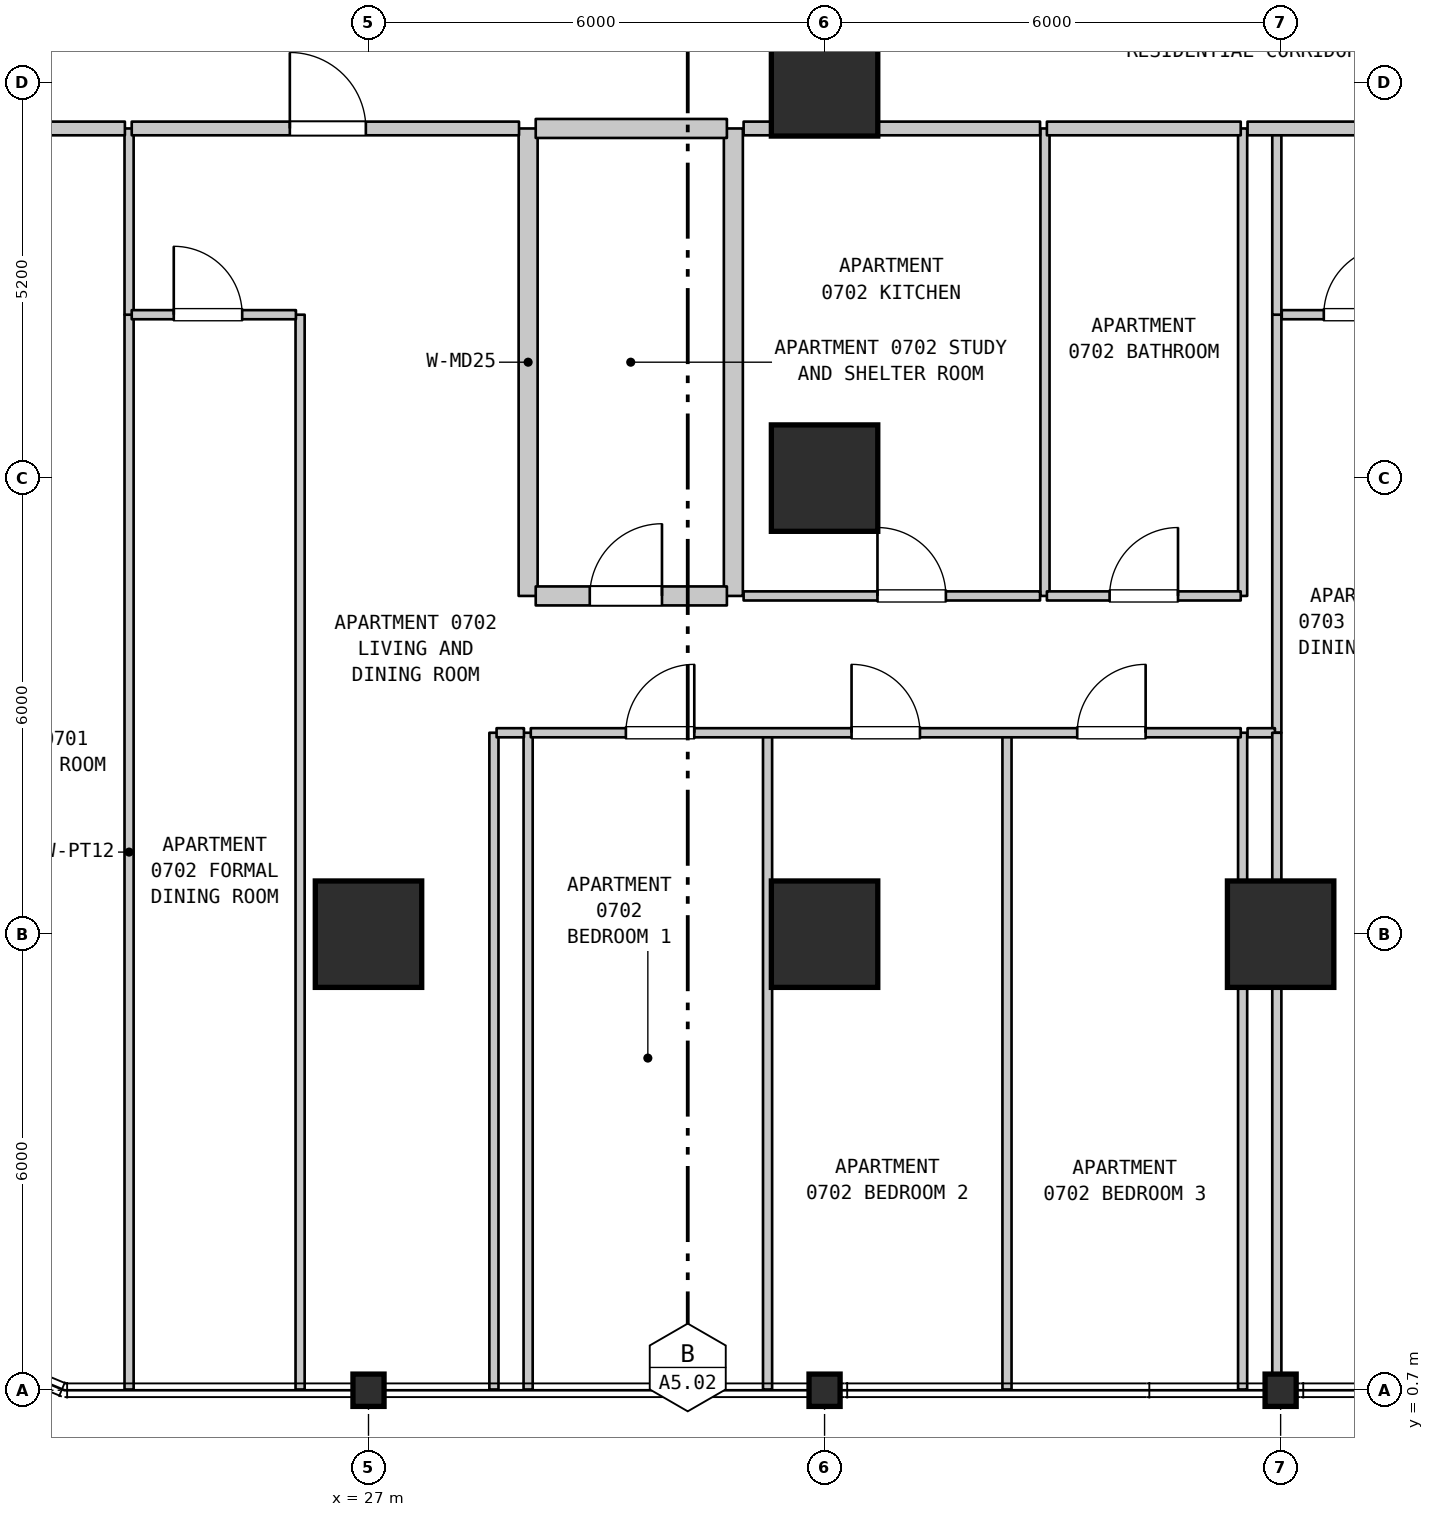
"""IFC4 building model, lengths in metres.
Left out: names, types, materials, properties, quantities, classifications, styles, units other than length and angle.
Written with IfcOpenShell. Run it as: python <this file> out.ifc"""

import sys

from ifc_helpers import new_model, si_unit, direction, frame, frame_2d, origin, origin_2d, place, context, subcontext, project, spatial, rectangle, i_section, extrude, element, fill, save


model = new_model("IFC4")
c1 = context("Model", 3, precision=1e-05, world=origin(), true_north=direction((0.0, 1.0)))
c2 = subcontext(c1, "Body", "Model", "MODEL_VIEW")
j1 = project(units=[si_unit("LENGTHUNIT", "METRE"), si_unit("PLANEANGLEUNIT", "RADIAN")], contexts=[c1])
p1 = place(None, origin())
s1 = spatial("IfcSite", under=j1, at=p1, CompositionType="ELEMENT")
p2 = place(p1, origin())
s2 = spatial("IfcBuilding", under=s1, at=p2, CompositionType="ELEMENT")
p3 = place(p2, frame((0.0, 0.0, 35.1)))
s3 = spatial("IfcBuildingStorey", under=s2, at=p3, CompositionType="ELEMENT", Elevation=35.1)
p4 = place(p3, frame((27.0, 0.7, 0.0), z_axis=(0.0, 0.0, 1.0), x_axis=(1.0, 0.0, 0.0)))
e1 = element("IfcColumn", 1, at=p4, inside=s3, PredefinedType="COLUMN", context=c2, shape_type="SweptSolid", body=[
    extrude(i_section(OverallWidth=0.409, OverallDepth=0.425, WebThickness=0.032, FlangeThickness=0.052, FilletRadius=0.015, at=origin_2d()), origin(), (0.0, 0.0, 1.0), 3.7),
])
p5 = place(p3, frame((27.0, 6.7, 0.0), z_axis=(0.0, 0.0, 1.0), x_axis=(1.0, 0.0, 0.0)))
e2 = element("IfcColumn", 2, at=p5, inside=s3, PredefinedType="COLUMN", context=c2, shape_type="SweptSolid", body=[
    extrude(rectangle(XDim=1.4, YDim=1.4, at=origin_2d()), origin(), (0.0, 0.0, 1.0), 3.7),
])
p6 = place(p3, frame((33.0, 0.7, 0.0), z_axis=(0.0, 0.0, 1.0), x_axis=(1.0, 0.0, 0.0)))
e3 = element("IfcColumn", 3, at=p6, inside=s3, PredefinedType="COLUMN", context=c2, shape_type="SweptSolid", body=[
    extrude(i_section(OverallWidth=0.409, OverallDepth=0.425, WebThickness=0.032, FlangeThickness=0.052, FilletRadius=0.015, at=origin_2d()), origin(), (0.0, 0.0, 1.0), 3.7),
])
for number, where, z_axis, x_axis in (
    (4, (33.0, 6.7, 0.0), (0.0, 0.0, 1.0), (1.0, 0.0, 0.0)),
    (5, (33.0, 12.7, 0.0), (0.0, 0.0, 1.0), (1.0, 0.0, 0.0)),
    (6, (33.0, 17.9, 0.0), (0.0, 0.0, 1.0), (1.0, 0.0, 0.0)),
):
    element("IfcColumn", number, at=place(p3, frame(where, z_axis=z_axis, x_axis=x_axis)), inside=s3, PredefinedType="COLUMN", context=c2, shape_type="SweptSolid", body=[
        extrude(rectangle(XDim=1.4, YDim=1.4, at=origin_2d()), origin(), (0.0, 0.0, 1.0), 3.7),
    ])
p7 = place(p3, frame((39.0, 0.7, 0.0), z_axis=(0.0, 0.0, 1.0), x_axis=(1.0, 0.0, 0.0)))
e7 = element("IfcColumn", 7, at=p7, inside=s3, PredefinedType="COLUMN", context=c2, shape_type="SweptSolid", body=[
    extrude(i_section(OverallWidth=0.409, OverallDepth=0.425, WebThickness=0.032, FlangeThickness=0.052, FilletRadius=0.015, at=origin_2d()), origin(), (0.0, 0.0, 1.0), 3.7),
])
p8 = place(p3, frame((39.0, 6.7, 0.0), z_axis=(0.0, 0.0, 1.0), x_axis=(1.0, 0.0, 0.0)))
e8 = element("IfcColumn", 8, at=p8, inside=s3, PredefinedType="COLUMN", context=c2, shape_type="SweptSolid", body=[
    extrude(rectangle(XDim=1.4, YDim=1.4, at=origin_2d()), origin(), (0.0, 0.0, 1.0), 3.7),
])
p9 = place(p3, frame((23.85, 0.71, 0.0), z_axis=(0.0, 0.0, 1.0), x_axis=(0.0, 1.0, 0.0)))
e9 = element("IfcWall", 9, at=p9, inside=s3, PredefinedType="PARTITIONING", context=c2, shape_type="SweptSolid", body=[
    extrude(rectangle(XDim=14.14, YDim=0.12, at=frame_2d((7.07, 0.0))), origin(), (0.0, 0.0, 1.0), 3.385),
])
p10 = place(p3, frame((23.85, 14.85, 0.0), z_axis=(0.0, 0.0, 1.0), x_axis=(0.0, 1.0, 0.0)))
e10 = element("IfcWall", 10, at=p10, inside=s3, PredefinedType="PARTITIONING", context=c2, shape_type="SweptSolid", body=[
    extrude(rectangle(XDim=2.45, YDim=0.12, at=frame_2d((1.225, 0.0))), origin(), (0.0, 0.0, 1.0), 3.385),
])
p11 = place(p3, frame((26.1, 0.71, 0.0), z_axis=(0.0, 0.0, 1.0), x_axis=(0.0, 1.0, 0.0)))
e11 = element("IfcWall", 11, at=p11, inside=s3, PredefinedType="PARTITIONING", context=c2, shape_type="SweptSolid", body=[
    extrude(rectangle(XDim=14.14, YDim=0.12, at=frame_2d((7.07, 0.0))), origin(), (0.0, 0.0, 1.0), 3.385),
])
for number, where, z_axis, x_axis in (
    (12, (28.65, 0.71, 0.0), (0.0, 0.0, 1.0), (0.0, 1.0, 0.0)),
    (13, (29.1, 0.71, 0.0), (0.0, 0.0, 1.0), (0.0, 1.0, 0.0)),
):
    element("IfcWall", number, at=place(p3, frame(where, z_axis=z_axis, x_axis=x_axis)), inside=s3, PredefinedType="PARTITIONING", context=c2, shape_type="SweptSolid", body=[
        extrude(rectangle(XDim=8.64, YDim=0.12, at=frame_2d((4.32, 0.0))), origin(), (0.0, 0.0, 1.0), 3.385),
    ])
for number, where, z_axis, x_axis in (
    (14, (29.1, 11.15, 0.0), (0.0, 0.0, 1.0), (0.0, 1.0, 0.0)),
    (15, (31.8, 11.15, 0.0), (0.0, 0.0, 1.0), (0.0, 1.0, 0.0)),
):
    element("IfcWall", number, at=place(p3, frame(where, z_axis=z_axis, x_axis=x_axis)), inside=s3, PredefinedType="STANDARD", context=c2, shape_type="SweptSolid", body=[
        extrude(rectangle(XDim=6.15, YDim=0.25, at=frame_2d((3.075, 0.0))), origin(), (0.0, 0.0, 1.0), 3.385),
    ])
for number, where, z_axis, x_axis in (
    (16, (32.25, 0.71, 0.0), (0.0, 0.0, 1.0), (0.0, 1.0, 0.0)),
    (17, (35.4, 0.71, 0.0), (0.0, 0.0, 1.0), (0.0, 1.0, 0.0)),
):
    element("IfcWall", number, at=place(p3, frame(where, z_axis=z_axis, x_axis=x_axis)), inside=s3, PredefinedType="PARTITIONING", context=c2, shape_type="SweptSolid", body=[
        extrude(rectangle(XDim=8.64, YDim=0.12, at=frame_2d((4.32, 0.0))), origin(), (0.0, 0.0, 1.0), 3.385),
    ])
p12 = place(p3, frame((35.9, 11.15, 0.0), z_axis=(0.0, 0.0, 1.0), x_axis=(0.0, 1.0, 0.0)))
e18 = element("IfcWall", 18, at=p12, inside=s3, PredefinedType="PARTITIONING", context=c2, shape_type="SweptSolid", body=[
    extrude(rectangle(XDim=6.15, YDim=0.12, at=frame_2d((3.075, 0.0))), origin(), (0.0, 0.0, 1.0), 3.385),
])
p13 = place(p3, frame((38.5, 0.71, 0.0), z_axis=(0.0, 0.0, 1.0), x_axis=(0.0, 1.0, 0.0)))
e19 = element("IfcWall", 19, at=p13, inside=s3, PredefinedType="PARTITIONING", context=c2, shape_type="SweptSolid", body=[
    extrude(rectangle(XDim=8.64, YDim=0.12, at=frame_2d((4.32, 0.0))), origin(), (0.0, 0.0, 1.0), 3.385),
])
p14 = place(p3, frame((38.5, 11.15, 0.0), z_axis=(0.0, 0.0, 1.0), x_axis=(0.0, 1.0, 0.0)))
e20 = element("IfcWall", 20, at=p14, inside=s3, PredefinedType="PARTITIONING", context=c2, shape_type="SweptSolid", body=[
    extrude(rectangle(XDim=6.15, YDim=0.12, at=frame_2d((3.075, 0.0))), origin(), (0.0, 0.0, 1.0), 3.385),
])
p15 = place(p3, frame((38.95, 0.71, 0.0), z_axis=(0.0, 0.0, 1.0), x_axis=(0.0, 1.0, 0.0)))
e21 = element("IfcWall", 21, at=p15, inside=s3, PredefinedType="PARTITIONING", context=c2, shape_type="SweptSolid", body=[
    extrude(rectangle(XDim=5.99, YDim=0.12, at=frame_2d((2.995, 0.0))), origin(), (0.0, 0.0, 1.0), 2.885),
])
p16 = place(p3, frame((38.95, 9.35, 0.0), z_axis=(0.0, 0.0, 1.0), x_axis=(0.0, 1.0, 0.0)))
e22 = element("IfcWall", 22, at=p16, inside=s3, PredefinedType="PARTITIONING", context=c2, shape_type="SweptSolid", body=[
    extrude(rectangle(XDim=5.5, YDim=0.12, at=frame_2d((2.75, 0.0))), origin(), (0.0, 0.0, 1.0), 3.385),
])
p17 = place(p3, frame((38.95, 14.85, 0.0), z_axis=(0.0, 0.0, 1.0), x_axis=(0.0, 1.0, 0.0)))
e23 = element("IfcWall", 23, at=p17, inside=s3, PredefinedType="PARTITIONING", context=c2, shape_type="SweptSolid", body=[
    extrude(rectangle(XDim=2.45, YDim=0.12, at=frame_2d((1.225, 0.0))), origin(), (0.0, 0.0, 1.0), 3.385),
])
p18 = place(p3, frame((28.685, 9.35, 0.0), z_axis=(0.0, 0.0, 1.0), x_axis=(1.0, 0.0, 0.0)))
e24 = element("IfcWall", 24, at=p18, inside=s3, PredefinedType="PARTITIONING", context=c2, shape_type="SweptSolid", body=[
    extrude(rectangle(XDim=0.36, YDim=0.12, at=frame_2d((0.18, 0.0))), origin(), (0.0, 0.0, 1.0), 3.385),
])
p19 = place(p3, frame((29.135, 9.35, 0.0), z_axis=(0.0, 0.0, 1.0), x_axis=(1.0, 0.0, 0.0)))
e25 = element("IfcWall", 25, at=p19, inside=s3, PredefinedType="PARTITIONING", context=c2, shape_type="SweptSolid", body=[
    extrude(rectangle(XDim=9.34, YDim=0.12, at=frame_2d((4.67, 0.0))), origin(), (0.0, 0.0, 1.0), 3.385),
])
p20 = place(p19, frame((1.251, 0.0, 0.0)))
e26 = element("IfcOpeningElement", 26, at=p20, cuts=e25, PredefinedType="OPENING", context=c2, shape_type="SweptSolid", body=[
    extrude(rectangle(XDim=0.9, YDim=2.15, at=frame_2d((0.45, 1.075))), frame((0.0, 0.07, 0.0), z_axis=(0.0, -1.0, 0.0), x_axis=(1.0, 0.0, 0.0)), (0.0, 0.0, 1.0), 0.14),
])
p21 = place(p19, frame((4.22, 0.0, 0.0)))
e27 = element("IfcOpeningElement", 27, at=p21, cuts=e25, PredefinedType="OPENING", context=c2, shape_type="SweptSolid", body=[
    extrude(rectangle(XDim=0.9, YDim=2.15, at=frame_2d((0.45, 1.075))), frame((0.0, 0.07, 0.0), z_axis=(0.0, -1.0, 0.0), x_axis=(1.0, 0.0, 0.0)), (0.0, 0.0, 1.0), 0.14),
])
p22 = place(p19, frame((7.189, 0.0, 0.0)))
e28 = element("IfcOpeningElement", 28, at=p22, cuts=e25, PredefinedType="OPENING", context=c2, shape_type="SweptSolid", body=[
    extrude(rectangle(XDim=0.9, YDim=2.15, at=frame_2d((0.45, 1.075))), frame((0.0, 0.07, 0.0), z_axis=(0.0, -1.0, 0.0), x_axis=(1.0, 0.0, 0.0)), (0.0, 0.0, 1.0), 0.14),
])
p23 = place(p3, frame((38.565, 9.35, 0.0), z_axis=(0.0, 0.0, 1.0), x_axis=(1.0, 0.0, 0.0)))
e29 = element("IfcWall", 29, at=p23, inside=s3, PredefinedType="PARTITIONING", context=c2, shape_type="SweptSolid", body=[
    extrude(rectangle(XDim=0.36, YDim=0.12, at=frame_2d((0.18, 0.0))), origin(), (0.0, 0.0, 1.0), 3.385),
])
p24 = place(p3, frame((29.2, 11.15, 0.0), z_axis=(0.0, 0.0, 1.0), x_axis=(1.0, 0.0, 0.0)))
e30 = element("IfcWall", 30, at=p24, inside=s3, PredefinedType="STANDARD", context=c2, shape_type="SweptSolid", body=[
    extrude(rectangle(XDim=2.515, YDim=0.25, at=frame_2d((1.258, 0.0))), origin(), (0.0, 0.0, 1.0), 3.385),
])
p25 = place(p24, frame((0.711, 0.0, 0.0)))
e31 = element("IfcOpeningElement", 31, at=p25, cuts=e30, PredefinedType="OPENING", context=c2, shape_type="SweptSolid", body=[
    extrude(rectangle(XDim=0.95, YDim=2.15, at=frame_2d((0.475, 1.075))), frame((0.0, 0.135, 0.0), z_axis=(0.0, -1.0, 0.0), x_axis=(1.0, 0.0, 0.0)), (0.0, 0.0, 1.0), 0.27),
])
p26 = place(p3, frame((31.935, 11.15, 0.0), z_axis=(0.0, 0.0, 1.0), x_axis=(1.0, 0.0, 0.0)))
e32 = element("IfcWall", 32, at=p26, inside=s3, PredefinedType="PARTITIONING", context=c2, shape_type="SweptSolid", body=[
    extrude(rectangle(XDim=3.9, YDim=0.12, at=frame_2d((1.95, 0.0))), origin(), (0.0, 0.0, 1.0), 3.385),
])
p27 = place(p26, frame((1.761, 0.0, 0.0)))
e33 = element("IfcOpeningElement", 33, at=p27, cuts=e32, PredefinedType="OPENING", context=c2, shape_type="SweptSolid", body=[
    extrude(rectangle(XDim=0.9, YDim=2.15, at=frame_2d((0.45, 1.075))), frame((0.0, 0.07, 0.0), z_axis=(0.0, -1.0, 0.0), x_axis=(1.0, 0.0, 0.0)), (0.0, 0.0, 1.0), 0.14),
])
p28 = place(p3, frame((35.925, 11.15, 0.0), z_axis=(0.0, 0.0, 1.0), x_axis=(1.0, 0.0, 0.0)))
e34 = element("IfcWall", 34, at=p28, inside=s3, PredefinedType="PARTITIONING", context=c2, shape_type="SweptSolid", body=[
    extrude(rectangle(XDim=2.55, YDim=0.12, at=frame_2d((1.275, 0.0))), origin(), (0.0, 0.0, 1.0), 3.385),
])
p29 = place(p28, frame((0.825, 0.0, 0.0)))
e35 = element("IfcOpeningElement", 35, at=p29, cuts=e34, PredefinedType="OPENING", context=c2, shape_type="SweptSolid", body=[
    extrude(rectangle(XDim=0.9, YDim=2.1, at=frame_2d((0.45, 1.05))), frame((0.0, 0.07, 0.0), z_axis=(0.0, -1.0, 0.0), x_axis=(1.0, 0.0, 0.0)), (0.0, 0.0, 1.0), 0.14),
])
p30 = place(p3, frame((23.885, 14.85, 0.0), z_axis=(0.0, 0.0, 1.0), x_axis=(1.0, 0.0, 0.0)))
e36 = element("IfcWall", 36, at=p30, inside=s3, PredefinedType="PARTITIONING", context=c2, shape_type="SweptSolid", body=[
    extrude(rectangle(XDim=2.16, YDim=0.12, at=frame_2d((1.08, 0.0))), origin(), (0.0, 0.0, 1.0), 3.385),
])
p31 = place(p30, frame((0.553, 0.0, 0.0)))
e37 = element("IfcOpeningElement", 37, at=p31, cuts=e36, PredefinedType="OPENING", context=c2, shape_type="SweptSolid", body=[
    extrude(rectangle(XDim=0.9, YDim=2.15, at=frame_2d((0.45, 1.075))), frame((0.0, 0.07, 0.0), z_axis=(0.0, -1.0, 0.0), x_axis=(1.0, 0.0, 0.0)), (0.0, 0.0, 1.0), 0.14),
])
p32 = place(p3, frame((39.015, 14.85, 0.0), z_axis=(0.0, 0.0, 1.0), x_axis=(1.0, 0.0, 0.0)))
e38 = element("IfcWall", 38, at=p32, inside=s3, PredefinedType="PARTITIONING", context=c2, shape_type="SweptSolid", body=[
    extrude(rectangle(XDim=2.16, YDim=0.12, at=frame_2d((1.08, 0.0))), origin(), (0.0, 0.0, 1.0), 3.385),
])
p33 = place(p32, frame((0.553, 0.0, 0.0)))
e39 = element("IfcOpeningElement", 39, at=p33, cuts=e38, PredefinedType="OPENING", context=c2, shape_type="SweptSolid", body=[
    extrude(rectangle(XDim=0.9, YDim=2.15, at=frame_2d((0.45, 1.075))), frame((0.0, 0.07, 0.0), z_axis=(0.0, -1.0, 0.0), x_axis=(1.0, 0.0, 0.0)), (0.0, 0.0, 1.0), 0.14),
])
p34 = place(p3, frame((21.385, 17.3, 0.0), z_axis=(0.0, 0.0, 1.0), x_axis=(1.0, 0.0, 0.0)))
e40 = element("IfcWall", 40, at=p34, inside=s3, PredefinedType="STANDARD", context=c2, shape_type="SweptSolid", body=[
    extrude(rectangle(XDim=2.41, YDim=0.18, at=frame_2d((1.205, 0.0))), origin(), (0.0, 0.0, 1.0), 3.385),
])
p35 = place(p3, frame((23.885, 17.3, 0.0), z_axis=(0.0, 0.0, 1.0), x_axis=(1.0, 0.0, 0.0)))
e41 = element("IfcWall", 41, at=p35, inside=s3, PredefinedType="STANDARD", context=c2, shape_type="SweptSolid", body=[
    extrude(rectangle(XDim=5.095, YDim=0.18, at=frame_2d((2.547, 0.0))), origin(), (0.0, 0.0, 1.0), 3.385),
])
p36 = place(p35, frame((2.08, 0.0, 0.0)))
e42 = element("IfcOpeningElement", 42, at=p36, cuts=e41, PredefinedType="OPENING", context=c2, shape_type="SweptSolid", body=[
    extrude(rectangle(XDim=1.0, YDim=2.15, at=frame_2d((0.5, 1.075))), frame((0.0, 0.1, 0.0), z_axis=(0.0, -1.0, 0.0), x_axis=(1.0, 0.0, 0.0)), (0.0, 0.0, 1.0), 0.2),
])
p37 = place(p3, frame((29.2, 17.3, 0.0), z_axis=(0.0, 0.0, 1.0), x_axis=(1.0, 0.0, 0.0)))
e43 = element("IfcWall", 43, at=p37, inside=s3, PredefinedType="STANDARD", context=c2, shape_type="SweptSolid", body=[
    extrude(rectangle(XDim=2.515, YDim=0.25, at=frame_2d((1.258, 0.0))), origin(), (0.0, 0.0, 1.0), 3.385),
])
p38 = place(p3, frame((31.935, 17.3, 0.0), z_axis=(0.0, 0.0, 1.0), x_axis=(1.0, 0.0, 0.0)))
e44 = element("IfcWall", 44, at=p38, inside=s3, PredefinedType="STANDARD", context=c2, shape_type="SweptSolid", body=[
    extrude(rectangle(XDim=3.9, YDim=0.18, at=frame_2d((1.95, 0.0))), origin(), (0.0, 0.0, 1.0), 3.385),
])
p39 = place(p3, frame((35.925, 17.3, 0.0), z_axis=(0.0, 0.0, 1.0), x_axis=(1.0, 0.0, 0.0)))
e45 = element("IfcWall", 45, at=p39, inside=s3, PredefinedType="STANDARD", context=c2, shape_type="SweptSolid", body=[
    extrude(rectangle(XDim=2.55, YDim=0.18, at=frame_2d((1.275, 0.0))), origin(), (0.0, 0.0, 1.0), 3.385),
])
p40 = place(p3, frame((38.565, 17.3, 0.0), z_axis=(0.0, 0.0, 1.0), x_axis=(1.0, 0.0, 0.0)))
e46 = element("IfcWall", 46, at=p40, inside=s3, PredefinedType="STANDARD", context=c2, shape_type="SweptSolid", body=[
    extrude(rectangle(XDim=5.545, YDim=0.18, at=frame_2d((2.772, 0.0))), origin(), (0.0, 0.0, 1.0), 3.385),
])
p41 = place(p40, frame((2.435, 0.0, 0.0)))
e47 = element("IfcOpeningElement", 47, at=p41, cuts=e46, PredefinedType="OPENING", context=c2, shape_type="SweptSolid", body=[
    extrude(rectangle(XDim=1.0, YDim=2.15, at=frame_2d((0.5, 1.075))), frame((0.0, 0.1, 0.0), z_axis=(0.0, -1.0, 0.0), x_axis=(1.0, 0.0, 0.0)), (0.0, 0.0, 1.0), 0.2),
])
p42 = place(p3, frame((38.95, 6.7, 0.0), z_axis=(0.0, 0.0, 1.0), x_axis=(0.0, 1.0, 0.0)))
e48 = element("IfcWall", 48, at=p42, inside=s3, PredefinedType="PARTITIONING", context=c2, shape_type="SweptSolid", body=[
    extrude(rectangle(XDim=2.65, YDim=0.12, at=frame_2d((1.325, 0.0))), origin(), (0.0, 0.0, 1.0), 3.385),
])
p43 = place(p20, origin())
e49 = element("IfcDoor", 49, at=p43, inside=s3, OperationType="SINGLE_SWING_RIGHT", PredefinedType="DOOR", context=c2, shape_type="SweptSolid", body=[
    extrude(rectangle(XDim=0.9, YDim=2.15, at=frame_2d((0.45, 1.075))), frame((0.0, 0.025, 0.0), z_axis=(0.0, -1.0, 0.0), x_axis=(1.0, 0.0, 0.0)), (0.0, 0.0, 1.0), 0.05),
])
fill(e26, e49)
p44 = place(p21, origin())
e50 = element("IfcDoor", 50, at=p44, inside=s3, OperationType="SINGLE_SWING_LEFT", PredefinedType="DOOR", context=c2, shape_type="SweptSolid", body=[
    extrude(rectangle(XDim=0.9, YDim=2.15, at=frame_2d((0.45, 1.075))), frame((0.0, 0.025, 0.0), z_axis=(0.0, -1.0, 0.0), x_axis=(1.0, 0.0, 0.0)), (0.0, 0.0, 1.0), 0.05),
])
fill(e27, e50)
p45 = place(p22, origin())
e51 = element("IfcDoor", 51, at=p45, inside=s3, OperationType="SINGLE_SWING_RIGHT", PredefinedType="DOOR", context=c2, shape_type="SweptSolid", body=[
    extrude(rectangle(XDim=0.9, YDim=2.15, at=frame_2d((0.45, 1.075))), frame((0.0, 0.025, 0.0), z_axis=(0.0, -1.0, 0.0), x_axis=(1.0, 0.0, 0.0)), (0.0, 0.0, 1.0), 0.05),
])
fill(e28, e51)
p46 = place(p25, origin())
e52 = element("IfcDoor", 52, at=p46, inside=s3, OperationType="SINGLE_SWING_RIGHT", PredefinedType="DOOR", context=c2, shape_type="SweptSolid", body=[
    extrude(rectangle(XDim=0.95, YDim=2.15, at=frame_2d((0.475, 1.075))), frame((0.0, 0.025, 0.0), z_axis=(0.0, -1.0, 0.0), x_axis=(1.0, 0.0, 0.0)), (0.0, 0.0, 1.0), 0.05),
])
fill(e31, e52)
p47 = place(p27, origin())
e53 = element("IfcDoor", 53, at=p47, inside=s3, OperationType="SINGLE_SWING_LEFT", PredefinedType="DOOR", context=c2, shape_type="SweptSolid", body=[
    extrude(rectangle(XDim=0.9, YDim=2.15, at=frame_2d((0.45, 1.075))), frame((0.0, 0.025, 0.0), z_axis=(0.0, -1.0, 0.0), x_axis=(1.0, 0.0, 0.0)), (0.0, 0.0, 1.0), 0.05),
])
fill(e33, e53)
p48 = place(p29, origin())
e54 = element("IfcDoor", 54, at=p48, inside=s3, OperationType="SINGLE_SWING_RIGHT", PredefinedType="DOOR", context=c2, shape_type="SweptSolid", body=[
    extrude(rectangle(XDim=0.9, YDim=2.1, at=frame_2d((0.45, 1.05))), frame((0.0, 0.025, 0.0), z_axis=(0.0, -1.0, 0.0), x_axis=(1.0, 0.0, 0.0)), (0.0, 0.0, 1.0), 0.05),
])
fill(e35, e54)
p49 = place(p31, origin())
e55 = element("IfcDoor", 55, at=p49, inside=s3, OperationType="SINGLE_SWING_LEFT", PredefinedType="DOOR", context=c2, shape_type="SweptSolid", body=[
    extrude(rectangle(XDim=0.9, YDim=2.15, at=frame_2d((0.45, 1.075))), frame((0.0, 0.025, 0.0), z_axis=(0.0, -1.0, 0.0), x_axis=(1.0, 0.0, 0.0)), (0.0, 0.0, 1.0), 0.05),
])
fill(e37, e55)
p50 = place(p33, origin())
e56 = element("IfcDoor", 56, at=p50, inside=s3, OperationType="SINGLE_SWING_RIGHT", PredefinedType="DOOR", context=c2, shape_type="SweptSolid", body=[
    extrude(rectangle(XDim=0.9, YDim=2.15, at=frame_2d((0.45, 1.075))), frame((0.0, 0.025, 0.0), z_axis=(0.0, -1.0, 0.0), x_axis=(1.0, 0.0, 0.0)), (0.0, 0.0, 1.0), 0.05),
])
fill(e39, e56)
p51 = place(p36, origin())
e57 = element("IfcDoor", 57, at=p51, inside=s3, OperationType="SINGLE_SWING_LEFT", PredefinedType="DOOR", context=c2, shape_type="SweptSolid", body=[
    extrude(rectangle(XDim=1.0, YDim=2.15, at=frame_2d((0.5, 1.075))), frame((0.0, 0.025, 0.0), z_axis=(0.0, -1.0, 0.0), x_axis=(1.0, 0.0, 0.0)), (0.0, 0.0, 1.0), 0.05),
])
fill(e42, e57)
save(model, sys.argv[1])
